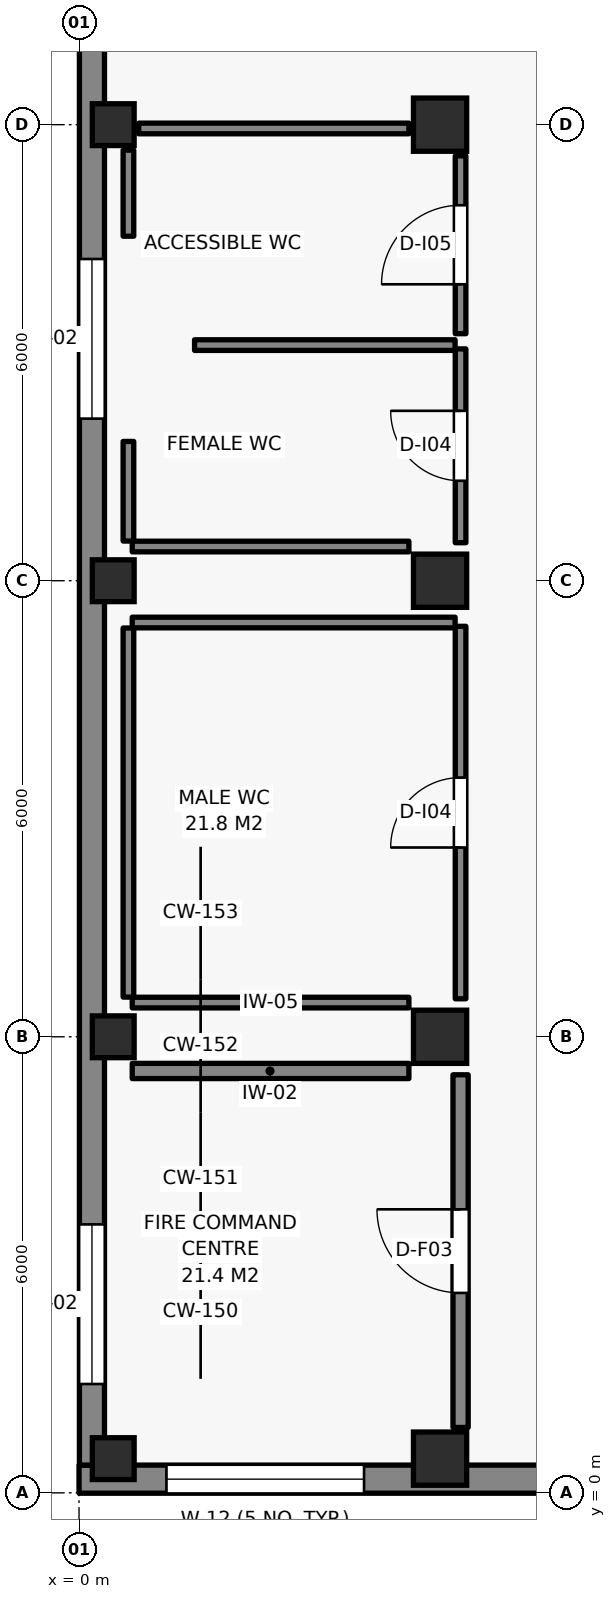
"""IFC4 building model, lengths in metres.
Left out: names, types, materials, properties, quantities, classifications, styles, units other than length and angle.
Written with IfcOpenShell. Run it as: python <this file> out.ifc"""

import sys

from ifc_helpers import new_model, si_unit, direction, frame, frame_2d, origin, origin_2d, place, context, subcontext, project, spatial, rectangle, extrude, element, fill, save


model = new_model("IFC4")
c1 = context("Model", 3, precision=1e-05, world=origin(), true_north=direction((0.0, 1.0)))
c2 = subcontext(c1, "Body", "Model", "MODEL_VIEW")
j1 = project(units=[si_unit("LENGTHUNIT", "METRE"), si_unit("PLANEANGLEUNIT", "RADIAN")], contexts=[c1])
p1 = place(None, origin())
s1 = spatial("IfcSite", under=j1, at=p1, CompositionType="ELEMENT")
p2 = place(p1, origin())
s2 = spatial("IfcBuilding", under=s1, at=p2, CompositionType="ELEMENT")
p3 = place(p2, origin())
s3 = spatial("IfcBuildingStorey", under=s2, at=p3, CompositionType="ELEMENT", Elevation=0.0)
for number, where, z_axis, x_axis in (
    (1, (0.45, 0.45, -0.4), (0.0, 0.0, 1.0), (1.0, 0.0, 0.0)),
    (2, (0.45, 6.0, -0.4), (0.0, 0.0, 1.0), (1.0, 0.0, 0.0)),
    (3, (0.45, 12.0, -0.4), (0.0, 0.0, 1.0), (1.0, 0.0, 0.0)),
    (4, (0.45, 18.0, -0.4), (0.0, 0.0, 1.0), (1.0, 0.0, 0.0)),
):
    element("IfcColumn", number, at=place(p3, frame(where, z_axis=z_axis, x_axis=x_axis)), inside=s3, PredefinedType="PILASTER", context=c2, shape_type="SweptSolid", body=[
        extrude(rectangle(XDim=0.55, YDim=0.55, at=origin_2d()), origin(), (0.0, 0.0, 1.0), 6.4),
    ])
for number, where, z_axis, x_axis in (
    (5, (4.75, 0.45, -0.4), (0.0, 0.0, 1.0), (1.0, 0.0, 0.0)),
    (6, (4.75, 6.0, -0.4), (0.0, 0.0, 1.0), (1.0, 0.0, 0.0)),
    (7, (4.75, 12.0, -0.4), (0.0, 0.0, 1.0), (1.0, 0.0, 0.0)),
    (8, (4.75, 18.0, -0.4), (0.0, 0.0, 1.0), (1.0, 0.0, 0.0)),
):
    element("IfcColumn", number, at=place(p3, frame(where, z_axis=z_axis, x_axis=x_axis)), inside=s3, PredefinedType="COLUMN", context=c2, shape_type="SweptSolid", body=[
        extrude(rectangle(XDim=0.7, YDim=0.7, at=origin_2d()), origin(), (0.0, 0.0, 1.0), 6.4),
    ])
p4 = place(p3, frame((0.0, 0.18, 0.0), z_axis=(0.0, 0.0, 1.0), x_axis=(1.0, 0.0, 0.0)))
e9 = element("IfcWall", 9, at=p4, inside=s3, PredefinedType="SOLIDWALL", context=c2, shape_type="SweptSolid", body=[
    extrude(rectangle(XDim=19.6, YDim=0.37, at=frame_2d((9.8, 0.0))), origin(), (0.0, 0.0, 1.0), 5.485),
])
p5 = place(p4, frame((1.15, 0.0, 0.82)))
e10 = element("IfcOpeningElement", 10, at=p5, cuts=e9, PredefinedType="OPENING", context=c2, shape_type="SweptSolid", body=[
    extrude(rectangle(XDim=2.6, YDim=2.65, at=frame_2d((1.3, 1.325))), frame((0.0, 0.195, 0.0), z_axis=(0.0, -1.0, 0.0), x_axis=(1.0, 0.0, 0.0)), (0.0, 0.0, 1.0), 0.39),
])
p6 = place(p4, frame((6.05, 0.0, 0.82)))
e11 = element("IfcOpeningElement", 11, at=p6, cuts=e9, PredefinedType="OPENING", context=c2, shape_type="SweptSolid", body=[
    extrude(rectangle(XDim=2.6, YDim=2.65, at=frame_2d((1.3, 1.325))), frame((0.0, 0.195, 0.0), z_axis=(0.0, -1.0, 0.0), x_axis=(1.0, 0.0, 0.0)), (0.0, 0.0, 1.0), 0.39),
])
p7 = place(p4, frame((10.95, 0.0, 0.82)))
e12 = element("IfcOpeningElement", 12, at=p7, cuts=e9, PredefinedType="OPENING", context=c2, shape_type="SweptSolid", body=[
    extrude(rectangle(XDim=2.6, YDim=2.65, at=frame_2d((1.3, 1.325))), frame((0.0, 0.195, 0.0), z_axis=(0.0, -1.0, 0.0), x_axis=(1.0, 0.0, 0.0)), (0.0, 0.0, 1.0), 0.39),
])
p8 = place(p4, frame((15.85, 0.0, 0.82)))
e13 = element("IfcOpeningElement", 13, at=p8, cuts=e9, PredefinedType="OPENING", context=c2, shape_type="SweptSolid", body=[
    extrude(rectangle(XDim=2.6, YDim=2.65, at=frame_2d((1.3, 1.325))), frame((0.0, 0.195, 0.0), z_axis=(0.0, -1.0, 0.0), x_axis=(1.0, 0.0, 0.0)), (0.0, 0.0, 1.0), 0.39),
])
p9 = place(p3, frame((0.17, 30.0, 0.0), z_axis=(0.0, 0.0, 1.0), x_axis=(0.0, -1.0, 0.0)))
e14 = element("IfcWall", 14, at=p9, inside=s3, PredefinedType="SOLIDWALL", context=c2, shape_type="SweptSolid", body=[
    extrude(rectangle(XDim=29.635, YDim=0.33, at=frame_2d((14.817, 0.0))), origin(), (0.0, 0.0, 1.0), 5.385),
])
p10 = place(p9, frame((1.067, 0.0, 0.82)))
e15 = element("IfcOpeningElement", 15, at=p10, cuts=e14, PredefinedType="OPENING", context=c2, shape_type="SweptSolid", body=[
    extrude(rectangle(XDim=2.1, YDim=2.55, at=frame_2d((1.05, 1.275))), frame((0.0, 0.175, 0.0), z_axis=(0.0, -1.0, 0.0), x_axis=(1.0, 0.0, 0.0)), (0.0, 0.0, 1.0), 0.35),
])
p11 = place(p9, frame((13.768, 0.0, 0.82)))
e16 = element("IfcOpeningElement", 16, at=p11, cuts=e14, PredefinedType="OPENING", context=c2, shape_type="SweptSolid", body=[
    extrude(rectangle(XDim=2.1, YDim=2.55, at=frame_2d((1.05, 1.275))), frame((0.0, 0.175, 0.0), z_axis=(0.0, -1.0, 0.0), x_axis=(1.0, 0.0, 0.0)), (0.0, 0.0, 1.0), 0.35),
])
p12 = place(p9, frame((26.468, 0.0, 0.82)))
e17 = element("IfcOpeningElement", 17, at=p12, cuts=e14, PredefinedType="OPENING", context=c2, shape_type="SweptSolid", body=[
    extrude(rectangle(XDim=2.1, YDim=2.55, at=frame_2d((1.05, 1.275))), frame((0.0, 0.175, 0.0), z_axis=(0.0, -1.0, 0.0), x_axis=(1.0, 0.0, 0.0)), (0.0, 0.0, 1.0), 0.35),
])
p13 = place(p3, frame((5.02, 0.86, 0.0), z_axis=(0.0, 0.0, 1.0), x_axis=(0.0, 1.0, 0.0)))
e18 = element("IfcWall", 18, at=p13, inside=s3, PredefinedType="PARTITIONING", context=c2, shape_type="SweptSolid", body=[
    extrude(rectangle(XDim=4.64, YDim=0.2, at=frame_2d((2.32, 0.0))), origin(), (0.0, 0.0, 1.0), 5.345),
])
p14 = place(p13, frame((1.77, 0.0, 0.0)))
e19 = element("IfcOpeningElement", 19, at=p14, cuts=e18, PredefinedType="OPENING", context=c2, shape_type="SweptSolid", body=[
    extrude(rectangle(XDim=1.1, YDim=2.15, at=frame_2d((0.55, 1.075))), frame((0.0, 0.11, 0.0), z_axis=(0.0, -1.0, 0.0), x_axis=(1.0, 0.0, 0.0)), (0.0, 0.0, 1.0), 0.22),
])
p15 = place(p3, frame((4.34, 5.55, 0.0), z_axis=(0.0, 0.0, 1.0), x_axis=(-1.0, 0.0, 0.0)))
e20 = element("IfcWall", 20, at=p15, inside=s3, PredefinedType="PARTITIONING", context=c2, shape_type="SweptSolid", body=[
    extrude(rectangle(XDim=3.64, YDim=0.2, at=frame_2d((1.82, 0.0))), origin(), (0.0, 0.0, 1.0), 5.385),
])
p16 = place(p3, frame((0.7, 6.45, 0.0), z_axis=(0.0, 0.0, 1.0), x_axis=(1.0, 0.0, 0.0)))
e21 = element("IfcWall", 21, at=p16, inside=s3, PredefinedType="PARTITIONING", context=c2, shape_type="SweptSolid", body=[
    extrude(rectangle(XDim=3.64, YDim=0.14, at=frame_2d((1.82, 0.0))), origin(), (0.0, 0.0, 1.0), 5.385),
])
p17 = place(p3, frame((5.02, 6.5, 0.0), z_axis=(0.0, 0.0, 1.0), x_axis=(0.0, 1.0, 0.0)))
e22 = element("IfcWall", 22, at=p17, inside=s3, PredefinedType="PARTITIONING", context=c2, shape_type="SweptSolid", body=[
    extrude(rectangle(XDim=4.9, YDim=0.14, at=frame_2d((2.45, 0.0))), origin(), (0.0, 0.0, 1.0), 5.345),
])
p18 = place(p17, frame((1.99, 0.0, 0.0)))
e23 = element("IfcOpeningElement", 23, at=p18, cuts=e22, PredefinedType="OPENING", context=c2, shape_type="SweptSolid", body=[
    extrude(rectangle(XDim=0.92, YDim=2.08, at=frame_2d((0.46, 1.04))), frame((0.0, 0.08, 0.0), z_axis=(0.0, -1.0, 0.0), x_axis=(1.0, 0.0, 0.0)), (0.0, 0.0, 1.0), 0.16),
])
p19 = place(p3, frame((4.948, 11.45, 0.0), z_axis=(0.0, 0.0, 1.0), x_axis=(-1.0, 0.0, 0.0)))
e24 = element("IfcWall", 24, at=p19, inside=s3, PredefinedType="PARTITIONING", context=c2, shape_type="SweptSolid", body=[
    extrude(rectangle(XDim=4.248, YDim=0.14, at=frame_2d((2.124, 0.0))), origin(), (0.0, 0.0, 1.0), 5.345),
])
p20 = place(p3, frame((0.65, 11.378, 0.0), z_axis=(0.0, 0.0, 1.0), x_axis=(0.0, -1.0, 0.0)))
e25 = element("IfcWall", 25, at=p20, inside=s3, PredefinedType="PARTITIONING", context=c2, shape_type="SweptSolid", body=[
    extrude(rectangle(XDim=4.856, YDim=0.14, at=frame_2d((2.428, 0.0))), origin(), (0.0, 0.0, 1.0), 5.385),
])
p21 = place(p3, frame((0.7, 12.45, 0.0), z_axis=(0.0, 0.0, 1.0), x_axis=(1.0, 0.0, 0.0)))
e26 = element("IfcWall", 26, at=p21, inside=s3, PredefinedType="PARTITIONING", context=c2, shape_type="SweptSolid", body=[
    extrude(rectangle(XDim=3.64, YDim=0.14, at=frame_2d((1.82, 0.0))), origin(), (0.0, 0.0, 1.0), 5.385),
])
p22 = place(p3, frame((5.02, 12.5, 0.0), z_axis=(0.0, 0.0, 1.0), x_axis=(0.0, 1.0, 0.0)))
e27 = element("IfcWall", 27, at=p22, inside=s3, PredefinedType="PARTITIONING", context=c2, shape_type="SweptSolid", body=[
    extrude(rectangle(XDim=2.55, YDim=0.14, at=frame_2d((1.275, 0.0))), origin(), (0.0, 0.0, 1.0), 5.345),
])
p23 = place(p22, frame((0.815, 0.0, 0.0)))
e28 = element("IfcOpeningElement", 28, at=p23, cuts=e27, PredefinedType="OPENING", context=c2, shape_type="SweptSolid", body=[
    extrude(rectangle(XDim=0.92, YDim=2.08, at=frame_2d((0.46, 1.04))), frame((0.0, 0.08, 0.0), z_axis=(0.0, -1.0, 0.0), x_axis=(1.0, 0.0, 0.0)), (0.0, 0.0, 1.0), 0.16),
])
p24 = place(p3, frame((4.948, 15.1, 0.0), z_axis=(0.0, 0.0, 1.0), x_axis=(-1.0, 0.0, 0.0)))
e29 = element("IfcWall", 29, at=p24, inside=s3, PredefinedType="PARTITIONING", context=c2, shape_type="SweptSolid", body=[
    extrude(rectangle(XDim=3.428, YDim=0.14, at=frame_2d((1.714, 0.0))), origin(), (0.0, 0.0, 1.0), 5.345),
])
p25 = place(p3, frame((0.65, 13.833, 0.0), z_axis=(0.0, 0.0, 1.0), x_axis=(0.0, -1.0, 0.0)))
e30 = element("IfcWall", 30, at=p25, inside=s3, PredefinedType="PARTITIONING", context=c2, shape_type="SweptSolid", body=[
    extrude(rectangle(XDim=1.311, YDim=0.14, at=frame_2d((0.655, 0.0))), origin(), (0.0, 0.0, 1.0), 5.385),
])
p26 = place(p3, frame((5.02, 15.25, 0.0), z_axis=(0.0, 0.0, 1.0), x_axis=(0.0, 1.0, 0.0)))
e31 = element("IfcWall", 31, at=p26, inside=s3, PredefinedType="PARTITIONING", context=c2, shape_type="SweptSolid", body=[
    extrude(rectangle(XDim=2.34, YDim=0.14, at=frame_2d((1.17, 0.0))), origin(), (0.0, 0.0, 1.0), 5.345),
])
p27 = place(p26, frame((0.65, 0.0, 0.0)))
e32 = element("IfcOpeningElement", 32, at=p27, cuts=e31, PredefinedType="OPENING", context=c2, shape_type="SweptSolid", body=[
    extrude(rectangle(XDim=1.04, YDim=2.1, at=frame_2d((0.52, 1.05))), frame((0.0, 0.08, 0.0), z_axis=(0.0, -1.0, 0.0), x_axis=(1.0, 0.0, 0.0)), (0.0, 0.0, 1.0), 0.16),
])
p28 = place(p3, frame((4.34, 17.95, 0.0), z_axis=(0.0, 0.0, 1.0), x_axis=(-1.0, 0.0, 0.0)))
e33 = element("IfcWall", 33, at=p28, inside=s3, PredefinedType="PARTITIONING", context=c2, shape_type="SweptSolid", body=[
    extrude(rectangle(XDim=3.555, YDim=0.14, at=frame_2d((1.778, 0.0))), origin(), (0.0, 0.0, 1.0), 5.485),
])
p29 = place(p3, frame((0.65, 17.665, 0.0), z_axis=(0.0, 0.0, 1.0), x_axis=(0.0, -1.0, 0.0)))
e34 = element("IfcWall", 34, at=p29, inside=s3, PredefinedType="PARTITIONING", context=c2, shape_type="SweptSolid", body=[
    extrude(rectangle(XDim=1.133, YDim=0.14, at=frame_2d((0.566, 0.0))), origin(), (0.0, 0.0, 1.0), 5.385),
])
p30 = place(p5, origin())
e35 = element("IfcWindow", 35, at=p30, inside=s3, PartitioningType="SINGLE_PANEL", PredefinedType="WINDOW", context=c2, shape_type="SweptSolid", body=[
    extrude(rectangle(XDim=2.6, YDim=2.65, at=frame_2d((1.3, 1.325))), frame((0.0, 0.03, 0.0), z_axis=(0.0, -1.0, 0.0), x_axis=(1.0, 0.0, 0.0)), (0.0, 0.0, 1.0), 0.06),
])
fill(e10, e35)
p31 = place(p11, origin())
e36 = element("IfcWindow", 36, at=p31, inside=s3, PartitioningType="SINGLE_PANEL", PredefinedType="WINDOW", context=c2, shape_type="SweptSolid", body=[
    extrude(rectangle(XDim=2.1, YDim=2.55, at=frame_2d((1.05, 1.275))), frame((0.0, 0.03, 0.0), z_axis=(0.0, -1.0, 0.0), x_axis=(1.0, 0.0, 0.0)), (0.0, 0.0, 1.0), 0.06),
])
fill(e16, e36)
p32 = place(p12, origin())
e37 = element("IfcWindow", 37, at=p32, inside=s3, PartitioningType="SINGLE_PANEL", PredefinedType="WINDOW", context=c2, shape_type="SweptSolid", body=[
    extrude(rectangle(XDim=2.1, YDim=2.55, at=frame_2d((1.05, 1.275))), frame((0.0, 0.03, 0.0), z_axis=(0.0, -1.0, 0.0), x_axis=(1.0, 0.0, 0.0)), (0.0, 0.0, 1.0), 0.06),
])
fill(e17, e37)
p33 = place(p14, origin())
e38 = element("IfcDoor", 38, at=p33, inside=s3, OperationType="SINGLE_SWING_RIGHT", PredefinedType="DOOR", context=c2, shape_type="SweptSolid", body=[
    extrude(rectangle(XDim=1.1, YDim=2.15, at=frame_2d((0.55, 1.075))), frame((0.0, 0.025, 0.0), z_axis=(0.0, -1.0, 0.0), x_axis=(1.0, 0.0, 0.0)), (0.0, 0.0, 1.0), 0.05),
])
fill(e19, e38)
p34 = place(p18, origin())
e39 = element("IfcDoor", 39, at=p34, inside=s3, OperationType="SINGLE_SWING_LEFT", PredefinedType="DOOR", context=c2, shape_type="SweptSolid", body=[
    extrude(rectangle(XDim=0.92, YDim=2.08, at=frame_2d((0.46, 1.04))), frame((0.0, 0.025, 0.0), z_axis=(0.0, -1.0, 0.0), x_axis=(1.0, 0.0, 0.0)), (0.0, 0.0, 1.0), 0.05),
])
fill(e23, e39)
p35 = place(p23, origin())
e40 = element("IfcDoor", 40, at=p35, inside=s3, OperationType="SINGLE_SWING_RIGHT", PredefinedType="DOOR", context=c2, shape_type="SweptSolid", body=[
    extrude(rectangle(XDim=0.92, YDim=2.08, at=frame_2d((0.46, 1.04))), frame((0.0, 0.025, 0.0), z_axis=(0.0, -1.0, 0.0), x_axis=(1.0, 0.0, 0.0)), (0.0, 0.0, 1.0), 0.05),
])
fill(e28, e40)
p36 = place(p27, origin())
e41 = element("IfcDoor", 41, at=p36, inside=s3, OperationType="SINGLE_SWING_LEFT", PredefinedType="DOOR", context=c2, shape_type="SweptSolid", body=[
    extrude(rectangle(XDim=1.04, YDim=2.1, at=frame_2d((0.52, 1.05))), frame((0.0, 0.025, 0.0), z_axis=(0.0, -1.0, 0.0), x_axis=(1.0, 0.0, 0.0)), (0.0, 0.0, 1.0), 0.05),
])
fill(e32, e41)
save(model, sys.argv[1])
